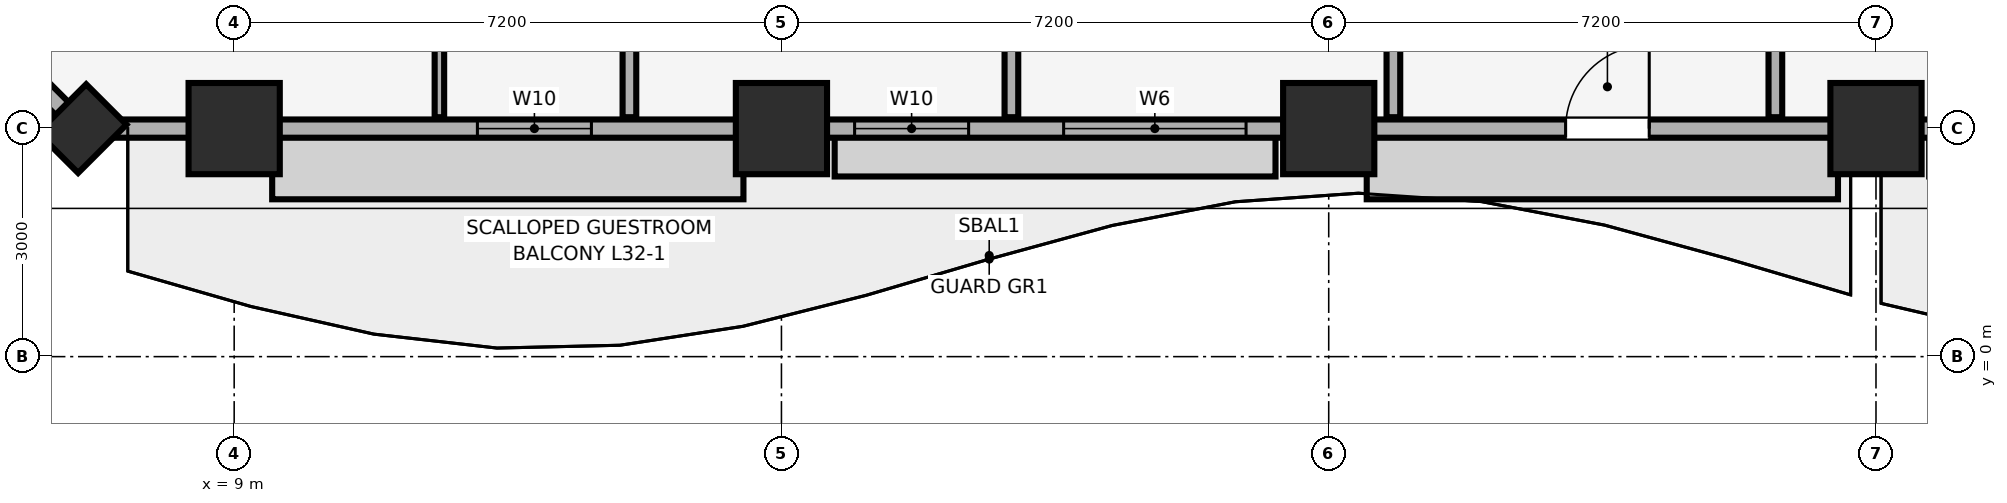
"""IFC4 building model, lengths in metres.
Left out: names, types, materials, properties, quantities, classifications, styles, units other than length and angle.
Written with IfcOpenShell. Run it as: python <this file> out.ifc"""

import sys

from ifc_helpers import new_model, si_unit, direction, frame, frame_2d, origin, origin_2d, place, context, subcontext, project, spatial, rectangle, extrude, element, fill, save


model = new_model("IFC4")
c1 = context("Model", 3, precision=1e-05, world=origin(), true_north=direction((0.0, 1.0)))
c2 = subcontext(c1, "Body", "Model", "MODEL_VIEW")
j1 = project(units=[si_unit("LENGTHUNIT", "METRE"), si_unit("PLANEANGLEUNIT", "RADIAN")], contexts=[c1])
p1 = place(None, origin())
s1 = spatial("IfcSite", under=j1, at=p1, CompositionType="ELEMENT")
p2 = place(p1, origin())
s2 = spatial("IfcBuilding", under=s1, at=p2, CompositionType="ELEMENT")
p3 = place(p2, frame((0.0, 0.0, 135.35)))
s3 = spatial("IfcBuildingStorey", under=s2, at=p3, CompositionType="ELEMENT", Elevation=135.35)
for number, where, z_axis, x_axis in (
    (1, (9.0, 3.0, 0.0), (0.0, 0.0, 1.0), (1.0, 0.0, 0.0)),
    (2, (16.2, 3.0, 0.0), (0.0, 0.0, 1.0), (1.0, 0.0, 0.0)),
    (3, (23.4, 3.0, 0.0), (0.0, 0.0, 1.0), (1.0, 0.0, 0.0)),
    (4, (30.6, 3.0, 0.0), (0.0, 0.0, 1.0), (1.0, 0.0, 0.0)),
):
    element("IfcColumn", number, at=place(p3, frame(where, z_axis=z_axis, x_axis=x_axis)), inside=s3, PredefinedType="COLUMN", context=c2, shape_type="SweptSolid", body=[
        extrude(rectangle(XDim=1.2, YDim=1.2, at=origin_2d()), origin(), (0.0, 0.0, 1.0), 3.56),
    ])
p4 = place(p3, frame((7.0, 3.0, 0.0), z_axis=(0.0, 0.0, 1.0), x_axis=(0.707106781187, 0.707106781187, 0.0)))
e5 = element("IfcColumn", 5, at=p4, inside=s3, PredefinedType="PILASTER", context=c2, shape_type="SweptSolid", body=[
    extrude(rectangle(XDim=0.9, YDim=0.75, at=origin_2d()), origin(), (0.0, 0.0, 1.0), 3.56),
])
p5 = place(p3, frame((7.0, 3.0, 0.0), z_axis=(0.0, 0.0, 1.0), x_axis=(1.0, 0.0, 0.0)))
e6 = element("IfcWall", 6, at=p5, inside=s3, PredefinedType="SOLIDWALL", context=c2, shape_type="SweptSolid", body=[
    extrude(rectangle(XDim=70.0, YDim=0.24, at=frame_2d((35.0, 0.0))), origin(), (0.0, 0.0, 1.0), 2.61),
])
p6 = place(p5, frame((19.517, 0.0, 0.0)))
e7 = element("IfcOpeningElement", 7, at=p6, cuts=e6, PredefinedType="OPENING", context=c2, shape_type="SweptSolid", body=[
    extrude(rectangle(XDim=1.1, YDim=2.15, at=frame_2d((0.55, 1.075))), frame((0.0, 0.13, 0.0), z_axis=(0.0, -1.0, 0.0), x_axis=(1.0, 0.0, 0.0)), (0.0, 0.0, 1.0), 0.26),
])
p7 = place(p5, frame((34.45, 0.0, 0.0)))
e8 = element("IfcOpeningElement", 8, at=p7, cuts=e6, PredefinedType="OPENING", context=c2, shape_type="SweptSolid", body=[
    extrude(rectangle(XDim=1.1, YDim=2.15, at=frame_2d((0.55, 1.075))), frame((0.0, 0.13, 0.0), z_axis=(0.0, -1.0, 0.0), x_axis=(1.0, 0.0, 0.0)), (0.0, 0.0, 1.0), 0.26),
])
p8 = place(p5, frame((49.421, 0.0, 0.0)))
e9 = element("IfcOpeningElement", 9, at=p8, cuts=e6, PredefinedType="OPENING", context=c2, shape_type="SweptSolid", body=[
    extrude(rectangle(XDim=1.1, YDim=2.15, at=frame_2d((0.55, 1.075))), frame((0.0, 0.13, 0.0), z_axis=(0.0, -1.0, 0.0), x_axis=(1.0, 0.0, 0.0)), (0.0, 0.0, 1.0), 0.26),
])
p9 = place(p5, frame((5.2, 0.0, 0.85)))
e10 = element("IfcOpeningElement", 10, at=p9, cuts=e6, PredefinedType="OPENING", context=c2, shape_type="SweptSolid", body=[
    extrude(rectangle(XDim=1.5, YDim=1.4, at=frame_2d((0.75, 0.7))), frame((0.0, 0.13, 0.0), z_axis=(0.0, -1.0, 0.0), x_axis=(1.0, 0.0, 0.0)), (0.0, 0.0, 1.0), 0.26),
])
p10 = place(p5, frame((10.163, 0.0, 0.85)))
e11 = element("IfcOpeningElement", 11, at=p10, cuts=e6, PredefinedType="OPENING", context=c2, shape_type="SweptSolid", body=[
    extrude(rectangle(XDim=1.5, YDim=1.4, at=frame_2d((0.75, 0.7))), frame((0.0, 0.13, 0.0), z_axis=(0.0, -1.0, 0.0), x_axis=(1.0, 0.0, 0.0)), (0.0, 0.0, 1.0), 0.26),
])
p11 = place(p5, frame((12.913, 0.0, 0.85)))
e12 = element("IfcOpeningElement", 12, at=p11, cuts=e6, PredefinedType="OPENING", context=c2, shape_type="SweptSolid", body=[
    extrude(rectangle(XDim=2.4, YDim=1.5, at=frame_2d((1.2, 0.75))), frame((0.0, 0.13, 0.0), z_axis=(0.0, -1.0, 0.0), x_axis=(1.0, 0.0, 0.0)), (0.0, 0.0, 1.0), 0.26),
])
p12 = place(p5, frame((24.45, 0.0, 0.85)))
e13 = element("IfcOpeningElement", 13, at=p12, cuts=e6, PredefinedType="OPENING", context=c2, shape_type="SweptSolid", body=[
    extrude(rectangle(XDim=2.4, YDim=1.5, at=frame_2d((1.2, 0.75))), frame((0.0, 0.13, 0.0), z_axis=(0.0, -1.0, 0.0), x_axis=(1.0, 0.0, 0.0)), (0.0, 0.0, 1.0), 0.26),
])
p13 = place(p5, frame((28.101, 0.0, 0.85)))
e14 = element("IfcOpeningElement", 14, at=p13, cuts=e6, PredefinedType="OPENING", context=c2, shape_type="SweptSolid", body=[
    extrude(rectangle(XDim=1.5, YDim=1.4, at=frame_2d((0.75, 0.7))), frame((0.0, 0.13, 0.0), z_axis=(0.0, -1.0, 0.0), x_axis=(1.0, 0.0, 0.0)), (0.0, 0.0, 1.0), 0.26),
])
p14 = place(p5, frame((40.239, 0.0, 0.85)))
e15 = element("IfcOpeningElement", 15, at=p14, cuts=e6, PredefinedType="OPENING", context=c2, shape_type="SweptSolid", body=[
    extrude(rectangle(XDim=1.5, YDim=1.4, at=frame_2d((0.75, 0.7))), frame((0.0, 0.13, 0.0), z_axis=(0.0, -1.0, 0.0), x_axis=(1.0, 0.0, 0.0)), (0.0, 0.0, 1.0), 0.26),
])
p15 = place(p5, frame((42.989, 0.0, 0.85)))
e16 = element("IfcOpeningElement", 16, at=p15, cuts=e6, PredefinedType="OPENING", context=c2, shape_type="SweptSolid", body=[
    extrude(rectangle(XDim=2.4, YDim=1.5, at=frame_2d((1.2, 0.75))), frame((0.0, 0.13, 0.0), z_axis=(0.0, -1.0, 0.0), x_axis=(1.0, 0.0, 0.0)), (0.0, 0.0, 1.0), 0.26),
])
p16 = place(p5, frame((54.581, 0.0, 0.85)))
e17 = element("IfcOpeningElement", 17, at=p16, cuts=e6, PredefinedType="OPENING", context=c2, shape_type="SweptSolid", body=[
    extrude(rectangle(XDim=2.4, YDim=1.5, at=frame_2d((1.2, 0.75))), frame((0.0, 0.13, 0.0), z_axis=(0.0, -1.0, 0.0), x_axis=(1.0, 0.0, 0.0)), (0.0, 0.0, 1.0), 0.26),
])
p17 = place(p5, frame((58.23, 0.0, 0.85)))
e18 = element("IfcOpeningElement", 18, at=p17, cuts=e6, PredefinedType="OPENING", context=c2, shape_type="SweptSolid", body=[
    extrude(rectangle(XDim=1.5, YDim=1.4, at=frame_2d((0.75, 0.7))), frame((0.0, 0.13, 0.0), z_axis=(0.0, -1.0, 0.0), x_axis=(1.0, 0.0, 0.0)), (0.0, 0.0, 1.0), 0.26),
])
p18 = place(p5, frame((63.3, 0.0, 0.85)))
e19 = element("IfcOpeningElement", 19, at=p18, cuts=e6, PredefinedType="OPENING", context=c2, shape_type="SweptSolid", body=[
    extrude(rectangle(XDim=1.5, YDim=1.4, at=frame_2d((0.75, 0.7))), frame((0.0, 0.13, 0.0), z_axis=(0.0, -1.0, 0.0), x_axis=(1.0, 0.0, 0.0)), (0.0, 0.0, 1.0), 0.26),
])
p19 = place(p3, frame((3.0, 7.0, 0.0), z_axis=(0.0, 0.0, 1.0), x_axis=(0.707106781187, -0.707106781187, 0.0)))
e20 = element("IfcWall", 20, at=p19, inside=s3, PredefinedType="SOLIDWALL", context=c2, shape_type="SweptSolid", body=[
    extrude(rectangle(XDim=5.657, YDim=0.24, at=frame_2d((2.828, 0.0))), origin(), (0.0, 0.0, 1.0), 2.61),
])
p20 = place(p19, frame((1.778, 0.0, 0.85)))
e21 = element("IfcOpeningElement", 21, at=p20, cuts=e20, PredefinedType="OPENING", context=c2, shape_type="SweptSolid", body=[
    extrude(rectangle(XDim=2.1, YDim=1.6, at=frame_2d((1.05, 0.8))), frame((0.0, 0.13, 0.0), z_axis=(0.0, -1.0, 0.0), x_axis=(1.0, 0.0, 0.0)), (0.0, 0.0, 1.0), 0.26),
])
for number, where, z_axis, x_axis in (
    (22, (14.2, 3.15, 0.0), (0.0, 0.0, 1.0), (0.0, 1.0, 0.0)),
    (23, (19.225, 3.15, 0.0), (0.0, 0.0, 1.0), (0.0, 1.0, 0.0)),
    (24, (24.251, 3.15, 0.0), (0.0, 0.0, 1.0), (0.0, 1.0, 0.0)),
    (25, (29.276, 3.15, 0.0), (0.0, 0.0, 1.0), (0.0, 1.0, 0.0)),
):
    element("IfcWall", number, at=place(p3, frame(where, z_axis=z_axis, x_axis=x_axis)), inside=s3, PredefinedType="PARTITIONING", context=c2, shape_type="SweptSolid", body=[
        extrude(rectangle(XDim=6.555, YDim=0.18, at=frame_2d((3.278, 0.0))), origin(), (0.0, 0.0, 1.0), 3.56),
    ])
p21 = place(p3, frame((11.7, 3.15, 0.0), z_axis=(0.0, 0.0, 1.0), x_axis=(0.0, 1.0, 0.0)))
e26 = element("IfcWall", 26, at=p21, inside=s3, PredefinedType="PARTITIONING", context=c2, shape_type="SweptSolid", body=[
    extrude(rectangle(XDim=2.153, YDim=0.125, at=frame_2d((1.076, 0.0))), origin(), (0.0, 0.0, 1.0), 3.56),
])
p22 = place(p6, origin())
e27 = element("IfcDoor", 27, at=p22, inside=s3, OperationType="SINGLE_SWING_RIGHT", PredefinedType="DOOR", context=c2, shape_type="SweptSolid", body=[
    extrude(rectangle(XDim=1.1, YDim=2.15, at=frame_2d((0.55, 1.075))), frame((0.0, 0.025, 0.0), z_axis=(0.0, -1.0, 0.0), x_axis=(1.0, 0.0, 0.0)), (0.0, 0.0, 1.0), 0.05),
])
fill(e7, e27)
p23 = place(p9, origin())
e28 = element("IfcWindow", 28, at=p23, inside=s3, PartitioningType="SINGLE_PANEL", PredefinedType="WINDOW", context=c2, shape_type="SweptSolid", body=[
    extrude(rectangle(XDim=1.5, YDim=1.4, at=frame_2d((0.75, 0.7))), frame((0.0, 0.03, 0.0), z_axis=(0.0, -1.0, 0.0), x_axis=(1.0, 0.0, 0.0)), (0.0, 0.0, 1.0), 0.06),
])
fill(e10, e28)
p24 = place(p10, origin())
e29 = element("IfcWindow", 29, at=p24, inside=s3, PartitioningType="SINGLE_PANEL", PredefinedType="WINDOW", context=c2, shape_type="SweptSolid", body=[
    extrude(rectangle(XDim=1.5, YDim=1.4, at=frame_2d((0.75, 0.7))), frame((0.0, 0.03, 0.0), z_axis=(0.0, -1.0, 0.0), x_axis=(1.0, 0.0, 0.0)), (0.0, 0.0, 1.0), 0.06),
])
fill(e11, e29)
p25 = place(p11, origin())
e30 = element("IfcWindow", 30, at=p25, inside=s3, PartitioningType="SINGLE_PANEL", PredefinedType="WINDOW", context=c2, shape_type="SweptSolid", body=[
    extrude(rectangle(XDim=2.4, YDim=1.5, at=frame_2d((1.2, 0.75))), frame((0.0, 0.03, 0.0), z_axis=(0.0, -1.0, 0.0), x_axis=(1.0, 0.0, 0.0)), (0.0, 0.0, 1.0), 0.06),
])
fill(e12, e30)
save(model, sys.argv[1])
